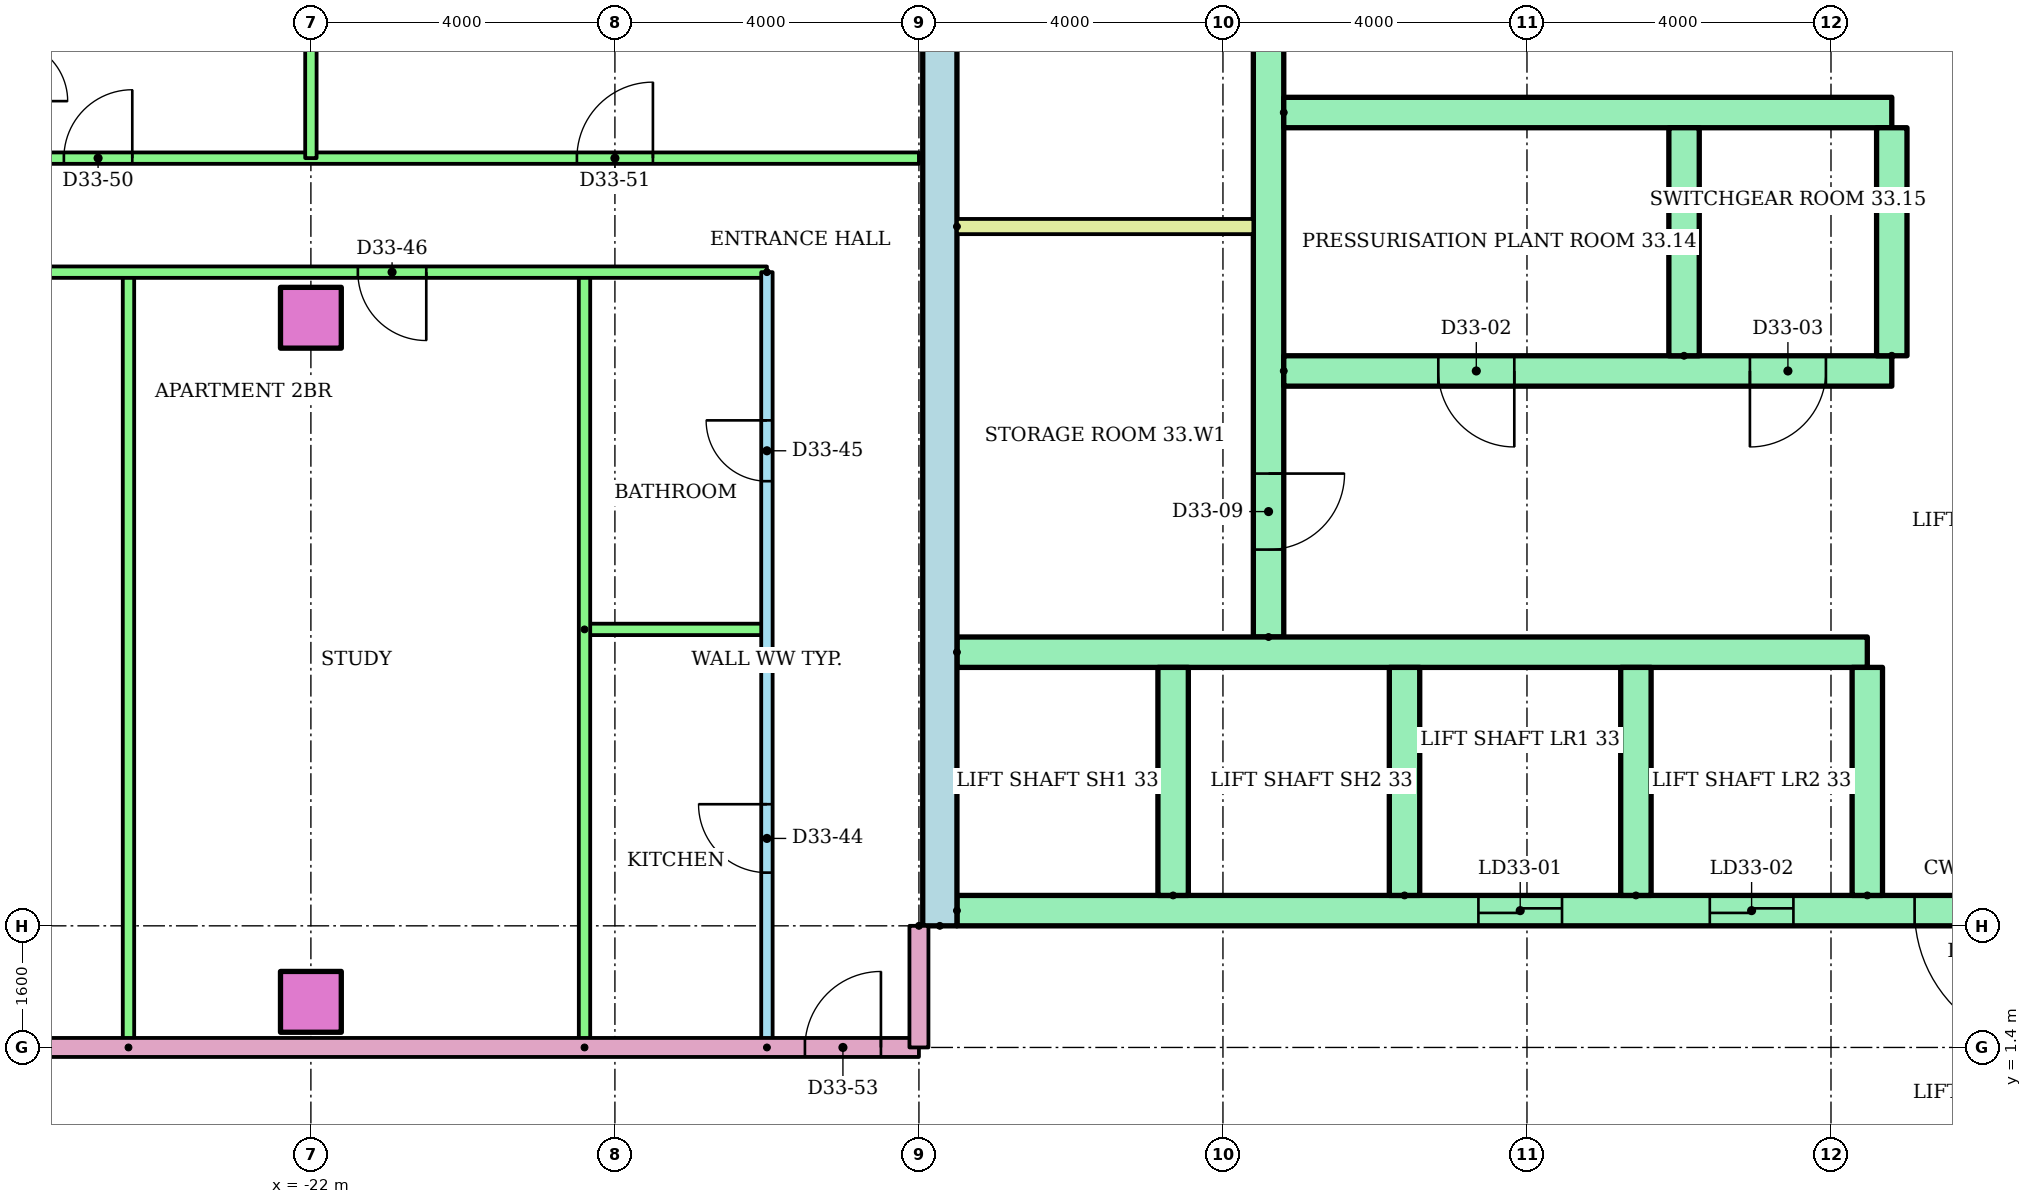
"""IFC4 building model, lengths in metres.
Left out: names, types, materials, properties, quantities, classifications, styles, units other than length and angle.
Written with IfcOpenShell. Run it as: python <this file> out.ifc"""

import sys

from ifc_helpers import new_model, si_unit, direction, frame, frame_2d, origin, origin_2d, place, context, subcontext, project, spatial, rectangle, extrude, element, fill, save


model = new_model("IFC4")
c1 = context("Model", 3, precision=1e-05, world=origin(), true_north=direction((0.0, 1.0)))
c2 = subcontext(c1, "Body", "Model", "MODEL_VIEW")
j1 = project(units=[si_unit("LENGTHUNIT", "METRE"), si_unit("PLANEANGLEUNIT", "RADIAN")], contexts=[c1])
p1 = place(None, origin())
s1 = spatial("IfcSite", under=j1, at=p1, CompositionType="ELEMENT")
p2 = place(p1, origin())
s2 = spatial("IfcBuilding", under=s1, at=p2, CompositionType="ELEMENT")
p3 = place(p2, frame((0.0, 0.0, 129.4)))
s3 = spatial("IfcBuildingStorey", under=s2, at=p3, CompositionType="ELEMENT", Elevation=129.4)
for number, where in (
    (1, (-22.0, 2.0, 0.0)),
    (2, (-22.0, 11.0, 0.0)),
):
    element("IfcColumn", number, at=place(p3, frame(where)), inside=s3, PredefinedType="COLUMN", context=c2, shape_type="SweptSolid", body=[
        extrude(rectangle(XDim=0.8, YDim=0.8, at=origin_2d()), origin(), (0.0, 0.0, 1.0), 3.2),
    ])
p4 = place(p3, frame((-13.725, 3.0, 0.0), z_axis=(0.0, 0.0, 1.0), x_axis=(0.0, 1.0, 0.0)))
e3 = element("IfcWall", 3, at=p4, inside=s3, PredefinedType="SHEAR", context=c2, shape_type="SweptSolid", body=[
    extrude(rectangle(XDim=17.0, YDim=0.45, at=frame_2d((8.5, 0.0))), origin(), (0.0, 0.0, 1.0), 2.92),
])
p5 = place(p3, frame((-9.4, 6.8, 0.0), z_axis=(0.0, 0.0, 1.0), x_axis=(0.0, 1.0, 0.0)))
e4 = element("IfcWall", 4, at=p5, inside=s3, PredefinedType="SHEAR", context=c2, shape_type="SweptSolid", body=[
    extrude(rectangle(XDim=12.7, YDim=0.4, at=frame_2d((6.35, 0.0))), origin(), (0.0, 0.0, 1.0), 2.92),
])
p6 = place(p5, frame((1.15, 0.0, 0.0)))
e5 = element("IfcOpeningElement", 5, at=p6, cuts=e4, PredefinedType="OPENING", context=c2, shape_type="SweptSolid", body=[
    extrude(rectangle(XDim=1.0, YDim=2.1, at=frame_2d((0.5, 1.05))), frame((0.0, 0.21, 0.0), z_axis=(0.0, -1.0, 0.0), x_axis=(1.0, 0.0, 0.0)), (0.0, 0.0, 1.0), 0.42),
])
p7 = place(p5, frame((7.925, 0.0, 0.0)))
e6 = element("IfcOpeningElement", 6, at=p7, cuts=e4, PredefinedType="OPENING", context=c2, shape_type="SweptSolid", body=[
    extrude(rectangle(XDim=1.0, YDim=2.1, at=frame_2d((0.5, 1.05))), frame((0.0, 0.21, 0.0), z_axis=(0.0, -1.0, 0.0), x_axis=(1.0, 0.0, 0.0)), (0.0, 0.0, 1.0), 0.42),
])
p8 = place(p3, frame((-13.5, 3.2, 0.0)))
e7 = element("IfcWall", 7, at=p8, inside=s3, PredefinedType="SHEAR", context=c2, shape_type="SweptSolid", body=[
    extrude(rectangle(XDim=27.0, YDim=0.4, at=frame_2d((13.5, 0.0))), origin(), (0.0, 0.0, 1.0), 2.92),
])
p9 = place(p8, frame((6.861, 0.0, 0.0)))
e8 = element("IfcOpeningElement", 8, at=p9, cuts=e7, PredefinedType="OPENING", context=c2, shape_type="SweptSolid", body=[
    extrude(rectangle(XDim=1.1, YDim=2.1, at=frame_2d((0.55, 1.05))), frame((0.0, 0.21, 0.0), z_axis=(0.0, -1.0, 0.0), x_axis=(1.0, 0.0, 0.0)), (0.0, 0.0, 1.0), 0.42),
])
p10 = place(p8, frame((9.906, 0.0, 0.0)))
e9 = element("IfcOpeningElement", 9, at=p10, cuts=e7, PredefinedType="OPENING", context=c2, shape_type="SweptSolid", body=[
    extrude(rectangle(XDim=1.1, YDim=2.1, at=frame_2d((0.55, 1.05))), frame((0.0, 0.21, 0.0), z_axis=(0.0, -1.0, 0.0), x_axis=(1.0, 0.0, 0.0)), (0.0, 0.0, 1.0), 0.42),
])
p11 = place(p8, frame((15.994, 0.0, 0.0)))
e10 = element("IfcOpeningElement", 10, at=p11, cuts=e7, PredefinedType="OPENING", context=c2, shape_type="SweptSolid", body=[
    extrude(rectangle(XDim=1.1, YDim=2.1, at=frame_2d((0.55, 1.05))), frame((0.0, 0.21, 0.0), z_axis=(0.0, -1.0, 0.0), x_axis=(1.0, 0.0, 0.0)), (0.0, 0.0, 1.0), 0.42),
])
p12 = place(p8, frame((19.039, 0.0, 0.0)))
e11 = element("IfcOpeningElement", 11, at=p12, cuts=e7, PredefinedType="OPENING", context=c2, shape_type="SweptSolid", body=[
    extrude(rectangle(XDim=1.1, YDim=2.1, at=frame_2d((0.55, 1.05))), frame((0.0, 0.21, 0.0), z_axis=(0.0, -1.0, 0.0), x_axis=(1.0, 0.0, 0.0)), (0.0, 0.0, 1.0), 0.42),
])
p13 = place(p8, frame((12.6, 0.0, 0.0)))
e12 = element("IfcOpeningElement", 12, at=p13, cuts=e7, PredefinedType="OPENING", context=c2, shape_type="SweptSolid", body=[
    extrude(rectangle(XDim=1.8, YDim=2.1, at=frame_2d((0.9, 1.05))), frame((0.0, 0.21, 0.0), z_axis=(0.0, -1.0, 0.0), x_axis=(1.0, 0.0, 0.0)), (0.0, 0.0, 1.0), 0.42),
])
p14 = place(p3, frame((-13.5, 6.6, 0.0)))
e13 = element("IfcWall", 13, at=p14, inside=s3, PredefinedType="SHEAR", context=c2, shape_type="SweptSolid", body=[
    extrude(rectangle(XDim=11.978, YDim=0.4, at=frame_2d((5.989, 0.0))), origin(), (0.0, 0.0, 1.0), 2.92),
])
for number, where, z_axis, x_axis in (
    (14, (-10.656, 3.4, 0.0), (0.0, 0.0, 1.0), (0.0, 1.0, 0.0)),
    (15, (-7.611, 3.4, 0.0), (0.0, 0.0, 1.0), (0.0, 1.0, 0.0)),
    (16, (-4.567, 3.4, 0.0), (0.0, 0.0, 1.0), (0.0, 1.0, 0.0)),
    (17, (-1.522, 3.4, 0.0), (0.0, 0.0, 1.0), (0.0, 1.0, 0.0)),
):
    element("IfcWall", number, at=place(p3, frame(where, z_axis=z_axis, x_axis=x_axis)), inside=s3, PredefinedType="SHEAR", context=c2, shape_type="SweptSolid", body=[
        extrude(rectangle(XDim=3.0, YDim=0.4, at=frame_2d((1.5, 0.0))), origin(), (0.0, 0.0, 1.0), 2.92),
    ])
p15 = place(p3, frame((-9.2, 10.3, 0.0)))
e18 = element("IfcWall", 18, at=p15, inside=s3, PredefinedType="SHEAR", context=c2, shape_type="SweptSolid", body=[
    extrude(rectangle(XDim=8.0, YDim=0.4, at=frame_2d((4.0, 0.0))), origin(), (0.0, 0.0, 1.0), 2.92),
])
p16 = place(p15, frame((2.033, 0.0, 0.0)))
e19 = element("IfcOpeningElement", 19, at=p16, cuts=e18, PredefinedType="OPENING", context=c2, shape_type="SweptSolid", body=[
    extrude(rectangle(XDim=1.0, YDim=2.1, at=frame_2d((0.5, 1.05))), frame((0.0, 0.21, 0.0), z_axis=(0.0, -1.0, 0.0), x_axis=(1.0, 0.0, 0.0)), (0.0, 0.0, 1.0), 0.42),
])
p17 = place(p15, frame((6.133, 0.0, 0.0)))
e20 = element("IfcOpeningElement", 20, at=p17, cuts=e18, PredefinedType="OPENING", context=c2, shape_type="SweptSolid", body=[
    extrude(rectangle(XDim=1.0, YDim=2.1, at=frame_2d((0.5, 1.05))), frame((0.0, 0.21, 0.0), z_axis=(0.0, -1.0, 0.0), x_axis=(1.0, 0.0, 0.0)), (0.0, 0.0, 1.0), 0.42),
])
p18 = place(p3, frame((-9.2, 13.7, 0.0)))
e21 = element("IfcWall", 21, at=p18, inside=s3, PredefinedType="SHEAR", context=c2, shape_type="SweptSolid", body=[
    extrude(rectangle(XDim=8.0, YDim=0.4, at=frame_2d((4.0, 0.0))), origin(), (0.0, 0.0, 1.0), 2.92),
])
for number, where, z_axis, x_axis in (
    (22, (-3.933, 10.5, 0.0), (0.0, 0.0, 1.0), (0.0, 1.0, 0.0)),
    (23, (-1.2, 10.5, 0.0), (0.0, 0.0, 1.0), (0.0, 1.0, 0.0)),
):
    element("IfcWall", number, at=place(p3, frame(where, z_axis=z_axis, x_axis=x_axis)), inside=s3, PredefinedType="SHEAR", context=c2, shape_type="SweptSolid", body=[
        extrude(rectangle(XDim=3.0, YDim=0.4, at=frame_2d((1.5, 0.0))), origin(), (0.0, 0.0, 1.0), 2.92),
    ])
p19 = place(p3, frame((-13.5, 12.2, 0.0)))
e24 = element("IfcWall", 24, at=p19, inside=s3, PredefinedType="PARTITIONING", context=c2, shape_type="SweptSolid", body=[
    extrude(rectangle(XDim=3.9, YDim=0.2, at=frame_2d((1.95, 0.0))), origin(), (0.0, 0.0, 1.0), 2.92),
])
p20 = place(p3, frame((-16.0, 1.4, 0.0), z_axis=(0.0, 0.0, 1.0), x_axis=(0.0, 1.0, 0.0)))
e25 = element("IfcWall", 25, at=p20, inside=s3, PredefinedType="PARTITIONING", context=c2, shape_type="SweptSolid", body=[
    extrude(rectangle(XDim=10.2, YDim=0.15, at=frame_2d((5.1, 0.0))), origin(), (0.0, 0.0, 1.0), 2.4),
])
p21 = place(p20, frame((2.3, 0.0, 0.0)))
e26 = element("IfcOpeningElement", 26, at=p21, cuts=e25, PredefinedType="OPENING", context=c2, shape_type="SweptSolid", body=[
    extrude(rectangle(XDim=0.9, YDim=2.1, at=frame_2d((0.45, 1.05))), frame((0.0, 0.085, 0.0), z_axis=(0.0, -1.0, 0.0), x_axis=(1.0, 0.0, 0.0)), (0.0, 0.0, 1.0), 0.17),
])
p22 = place(p20, frame((7.45, 0.0, 0.0)))
e27 = element("IfcOpeningElement", 27, at=p22, cuts=e25, PredefinedType="OPENING", context=c2, shape_type="SweptSolid", body=[
    extrude(rectangle(XDim=0.8, YDim=2.1, at=frame_2d((0.4, 1.05))), frame((0.0, 0.085, 0.0), z_axis=(0.0, -1.0, 0.0), x_axis=(1.0, 0.0, 0.0)), (0.0, 0.0, 1.0), 0.17),
])
p23 = place(p3, frame((-18.4, 6.9, 0.0)))
e28 = element("IfcWall", 28, at=p23, inside=s3, PredefinedType="PARTITIONING", context=c2, shape_type="SweptSolid", body=[
    extrude(rectangle(XDim=2.4, YDim=0.15, at=frame_2d((1.2, 0.0))), origin(), (0.0, 0.0, 1.0), 2.4),
])
for number, where, z_axis, x_axis in (
    (29, (-18.4, 1.4, 0.0), (0.0, 0.0, 1.0), (0.0, 1.0, 0.0)),
    (30, (-24.4, 1.4, 0.0), (0.0, 0.0, 1.0), (0.0, 1.0, 0.0)),
):
    element("IfcWall", number, at=place(p3, frame(where, z_axis=z_axis, x_axis=x_axis)), inside=s3, PredefinedType="PARTITIONING", context=c2, shape_type="SweptSolid", body=[
        extrude(rectangle(XDim=10.2, YDim=0.15, at=frame_2d((5.1, 0.0))), origin(), (0.0, 0.0, 1.0), 2.4),
    ])
p24 = place(p3, frame((-16.0, 11.6, 0.0), z_axis=(0.0, 0.0, 1.0), x_axis=(-1.0, 0.0, 0.0)))
e31 = element("IfcWall", 31, at=p24, inside=s3, PredefinedType="PARTITIONING", context=c2, shape_type="SweptSolid", body=[
    extrude(rectangle(XDim=16.72, YDim=0.15, at=frame_2d((8.36, 0.0))), origin(), (0.0, 0.0, 1.0), 2.4),
])
p25 = place(p24, frame((4.482, 0.0, 0.0)))
e32 = element("IfcOpeningElement", 32, at=p25, cuts=e31, PredefinedType="OPENING", context=c2, shape_type="SweptSolid", body=[
    extrude(rectangle(XDim=0.9, YDim=2.1, at=frame_2d((0.45, 1.05))), frame((0.0, 0.085, 0.0), z_axis=(0.0, -1.0, 0.0), x_axis=(1.0, 0.0, 0.0)), (0.0, 0.0, 1.0), 0.17),
])
p26 = place(p24, frame((10.325, 0.0, 0.0)))
e33 = element("IfcOpeningElement", 33, at=p26, cuts=e31, PredefinedType="OPENING", context=c2, shape_type="SweptSolid", body=[
    extrude(rectangle(XDim=0.9, YDim=2.1, at=frame_2d((0.45, 1.05))), frame((0.0, 0.085, 0.0), z_axis=(0.0, -1.0, 0.0), x_axis=(1.0, 0.0, 0.0)), (0.0, 0.0, 1.0), 0.17),
])
p27 = place(p24, frame((14.618, 0.0, 0.0)))
e34 = element("IfcOpeningElement", 34, at=p27, cuts=e31, PredefinedType="OPENING", context=c2, shape_type="SweptSolid", body=[
    extrude(rectangle(XDim=0.9, YDim=2.1, at=frame_2d((0.45, 1.05))), frame((0.0, 0.085, 0.0), z_axis=(0.0, -1.0, 0.0), x_axis=(1.0, 0.0, 0.0)), (0.0, 0.0, 1.0), 0.17),
])
p28 = place(p3, frame((-32.72, 13.1, 0.0)))
e35 = element("IfcWall", 35, at=p28, inside=s3, PredefinedType="PARTITIONING", context=c2, shape_type="SweptSolid", body=[
    extrude(rectangle(XDim=18.72, YDim=0.15, at=frame_2d((9.36, 0.0))), origin(), (0.0, 0.0, 1.0), 2.4),
])
p29 = place(p28, frame((2.02, 0.0, 0.0)))
e36 = element("IfcOpeningElement", 36, at=p29, cuts=e35, PredefinedType="OPENING", context=c2, shape_type="SweptSolid", body=[
    extrude(rectangle(XDim=0.9, YDim=2.1, at=frame_2d((0.45, 1.05))), frame((0.0, 0.085, 0.0), z_axis=(0.0, -1.0, 0.0), x_axis=(1.0, 0.0, 0.0)), (0.0, 0.0, 1.0), 0.17),
])
p30 = place(p28, frame((7.47, 0.0, 0.0)))
e37 = element("IfcOpeningElement", 37, at=p30, cuts=e35, PredefinedType="OPENING", context=c2, shape_type="SweptSolid", body=[
    extrude(rectangle(XDim=0.9, YDim=2.1, at=frame_2d((0.45, 1.05))), frame((0.0, 0.085, 0.0), z_axis=(0.0, -1.0, 0.0), x_axis=(1.0, 0.0, 0.0)), (0.0, 0.0, 1.0), 0.17),
])
p31 = place(p28, frame((14.22, 0.0, 0.0)))
e38 = element("IfcOpeningElement", 38, at=p31, cuts=e35, PredefinedType="OPENING", context=c2, shape_type="SweptSolid", body=[
    extrude(rectangle(XDim=1.0, YDim=2.1, at=frame_2d((0.5, 1.05))), frame((0.0, 0.085, 0.0), z_axis=(0.0, -1.0, 0.0), x_axis=(1.0, 0.0, 0.0)), (0.0, 0.0, 1.0), 0.17),
])
p32 = place(p3, frame((-22.0, 18.721, 0.0), z_axis=(0.0, 0.0, 1.0), x_axis=(0.0, -1.0, 0.0)))
e39 = element("IfcWall", 39, at=p32, inside=s3, PredefinedType="PARTITIONING", context=c2, shape_type="SweptSolid", body=[
    extrude(rectangle(XDim=5.621, YDim=0.15, at=frame_2d((2.811, 0.0))), origin(), (0.0, 0.0, 1.0), 2.4),
])
p33 = place(p3, frame((-29.0, 1.4, 0.0)))
e40 = element("IfcWall", 40, at=p33, inside=s3, PredefinedType="PARTITIONING", context=c2, shape_type="SweptSolid", body=[
    extrude(rectangle(XDim=15.0, YDim=0.25, at=frame_2d((7.5, 0.0))), origin(), (0.0, 0.0, 1.0), 2.4),
])
p34 = place(p33, frame((13.5, 0.0, 0.0)))
e41 = element("IfcOpeningElement", 41, at=p34, cuts=e40, PredefinedType="OPENING", context=c2, shape_type="SweptSolid", body=[
    extrude(rectangle(XDim=1.0, YDim=2.1, at=frame_2d((0.5, 1.05))), frame((0.0, 0.135, 0.0), z_axis=(0.0, -1.0, 0.0), x_axis=(1.0, 0.0, 0.0)), (0.0, 0.0, 1.0), 0.27),
])
p35 = place(p3, frame((-14.0, 3.0, 0.0), z_axis=(0.0, 0.0, 1.0), x_axis=(0.0, -1.0, 0.0)))
e42 = element("IfcWall", 42, at=p35, inside=s3, PredefinedType="PARTITIONING", context=c2, shape_type="SweptSolid", body=[
    extrude(rectangle(XDim=1.6, YDim=0.25, at=frame_2d((0.8, 0.0))), origin(), (0.0, 0.0, 1.0), 2.4),
])
p36 = place(p9, origin())
e43 = element("IfcDoor", 43, at=p36, inside=s3, OperationType="SLIDING_TO_LEFT", PredefinedType="DOOR", context=c2, shape_type="SweptSolid", body=[
    extrude(rectangle(XDim=1.1, YDim=2.1, at=frame_2d((0.55, 1.05))), frame((0.0, 0.025, 0.0), z_axis=(0.0, -1.0, 0.0), x_axis=(1.0, 0.0, 0.0)), (0.0, 0.0, 1.0), 0.05),
])
fill(e8, e43)
p37 = place(p10, origin())
e44 = element("IfcDoor", 44, at=p37, inside=s3, OperationType="SLIDING_TO_LEFT", PredefinedType="DOOR", context=c2, shape_type="SweptSolid", body=[
    extrude(rectangle(XDim=1.1, YDim=2.1, at=frame_2d((0.55, 1.05))), frame((0.0, 0.025, 0.0), z_axis=(0.0, -1.0, 0.0), x_axis=(1.0, 0.0, 0.0)), (0.0, 0.0, 1.0), 0.05),
])
fill(e9, e44)
p38 = place(p13, frame((1.8, 0.0, 0.0), z_axis=(0.0, 0.0, 1.0), x_axis=(-1.0, 0.0, 0.0)))
e45 = element("IfcDoor", 45, at=p38, inside=s3, OperationType="DOUBLE_DOOR_SINGLE_SWING", PredefinedType="DOOR", context=c2, shape_type="SweptSolid", body=[
    extrude(rectangle(XDim=1.8, YDim=2.1, at=frame_2d((0.9, 1.05))), frame((0.0, 0.025, 0.0), z_axis=(0.0, -1.0, 0.0), x_axis=(1.0, 0.0, 0.0)), (0.0, 0.0, 1.0), 0.05),
])
fill(e12, e45)
p39 = place(p16, frame((1.0, 0.0, 0.0), z_axis=(0.0, 0.0, 1.0), x_axis=(-1.0, 0.0, 0.0)))
e46 = element("IfcDoor", 46, at=p39, inside=s3, OperationType="SINGLE_SWING_RIGHT", PredefinedType="DOOR", context=c2, shape_type="SweptSolid", body=[
    extrude(rectangle(XDim=1.0, YDim=2.1, at=frame_2d((0.5, 1.05))), frame((0.0, 0.025, 0.0), z_axis=(0.0, -1.0, 0.0), x_axis=(1.0, 0.0, 0.0)), (0.0, 0.0, 1.0), 0.05),
])
fill(e19, e46)
p40 = place(p17, frame((1.0, 0.0, 0.0), z_axis=(0.0, 0.0, 1.0), x_axis=(-1.0, 0.0, 0.0)))
e47 = element("IfcDoor", 47, at=p40, inside=s3, OperationType="SINGLE_SWING_LEFT", PredefinedType="DOOR", context=c2, shape_type="SweptSolid", body=[
    extrude(rectangle(XDim=1.0, YDim=2.1, at=frame_2d((0.5, 1.05))), frame((0.0, 0.025, 0.0), z_axis=(0.0, -1.0, 0.0), x_axis=(1.0, 0.0, 0.0)), (0.0, 0.0, 1.0), 0.05),
])
fill(e20, e47)
p41 = place(p6, frame((1.0, 0.0, 0.0), z_axis=(0.0, 0.0, 1.0), x_axis=(-1.0, 0.0, 0.0)))
e48 = element("IfcDoor", 48, at=p41, inside=s3, OperationType="SINGLE_SWING_RIGHT", PredefinedType="DOOR", context=c2, shape_type="SweptSolid", body=[
    extrude(rectangle(XDim=1.0, YDim=2.1, at=frame_2d((0.5, 1.05))), frame((0.0, 0.025, 0.0), z_axis=(0.0, -1.0, 0.0), x_axis=(1.0, 0.0, 0.0)), (0.0, 0.0, 1.0), 0.05),
])
fill(e5, e48)
p42 = place(p21, origin())
e49 = element("IfcDoor", 49, at=p42, inside=s3, OperationType="SINGLE_SWING_RIGHT", PredefinedType="DOOR", context=c2, shape_type="SweptSolid", body=[
    extrude(rectangle(XDim=0.9, YDim=2.1, at=frame_2d((0.45, 1.05))), frame((0.0, 0.025, 0.0), z_axis=(0.0, -1.0, 0.0), x_axis=(1.0, 0.0, 0.0)), (0.0, 0.0, 1.0), 0.05),
])
fill(e26, e49)
p43 = place(p22, origin())
e50 = element("IfcDoor", 50, at=p43, inside=s3, OperationType="SINGLE_SWING_RIGHT", PredefinedType="DOOR", context=c2, shape_type="SweptSolid", body=[
    extrude(rectangle(XDim=0.8, YDim=2.1, at=frame_2d((0.4, 1.05))), frame((0.0, 0.025, 0.0), z_axis=(0.0, -1.0, 0.0), x_axis=(1.0, 0.0, 0.0)), (0.0, 0.0, 1.0), 0.05),
])
fill(e27, e50)
p44 = place(p25, origin())
e51 = element("IfcDoor", 51, at=p44, inside=s3, OperationType="SINGLE_SWING_LEFT", PredefinedType="DOOR", context=c2, shape_type="SweptSolid", body=[
    extrude(rectangle(XDim=0.9, YDim=2.1, at=frame_2d((0.45, 1.05))), frame((0.0, 0.025, 0.0), z_axis=(0.0, -1.0, 0.0), x_axis=(1.0, 0.0, 0.0)), (0.0, 0.0, 1.0), 0.05),
])
fill(e32, e51)
p45 = place(p30, origin())
e52 = element("IfcDoor", 52, at=p45, inside=s3, OperationType="SINGLE_SWING_RIGHT", PredefinedType="DOOR", context=c2, shape_type="SweptSolid", body=[
    extrude(rectangle(XDim=0.9, YDim=2.1, at=frame_2d((0.45, 1.05))), frame((0.0, 0.025, 0.0), z_axis=(0.0, -1.0, 0.0), x_axis=(1.0, 0.0, 0.0)), (0.0, 0.0, 1.0), 0.05),
])
fill(e37, e52)
p46 = place(p31, origin())
e53 = element("IfcDoor", 53, at=p46, inside=s3, OperationType="SINGLE_SWING_RIGHT", PredefinedType="DOOR", context=c2, shape_type="SweptSolid", body=[
    extrude(rectangle(XDim=1.0, YDim=2.1, at=frame_2d((0.5, 1.05))), frame((0.0, 0.025, 0.0), z_axis=(0.0, -1.0, 0.0), x_axis=(1.0, 0.0, 0.0)), (0.0, 0.0, 1.0), 0.05),
])
fill(e38, e53)
p47 = place(p34, origin())
e54 = element("IfcDoor", 54, at=p47, inside=s3, OperationType="SINGLE_SWING_RIGHT", PredefinedType="DOOR", context=c2, shape_type="SweptSolid", body=[
    extrude(rectangle(XDim=1.0, YDim=2.1, at=frame_2d((0.5, 1.05))), frame((0.0, 0.025, 0.0), z_axis=(0.0, -1.0, 0.0), x_axis=(1.0, 0.0, 0.0)), (0.0, 0.0, 1.0), 0.05),
])
fill(e41, e54)
save(model, sys.argv[1])
